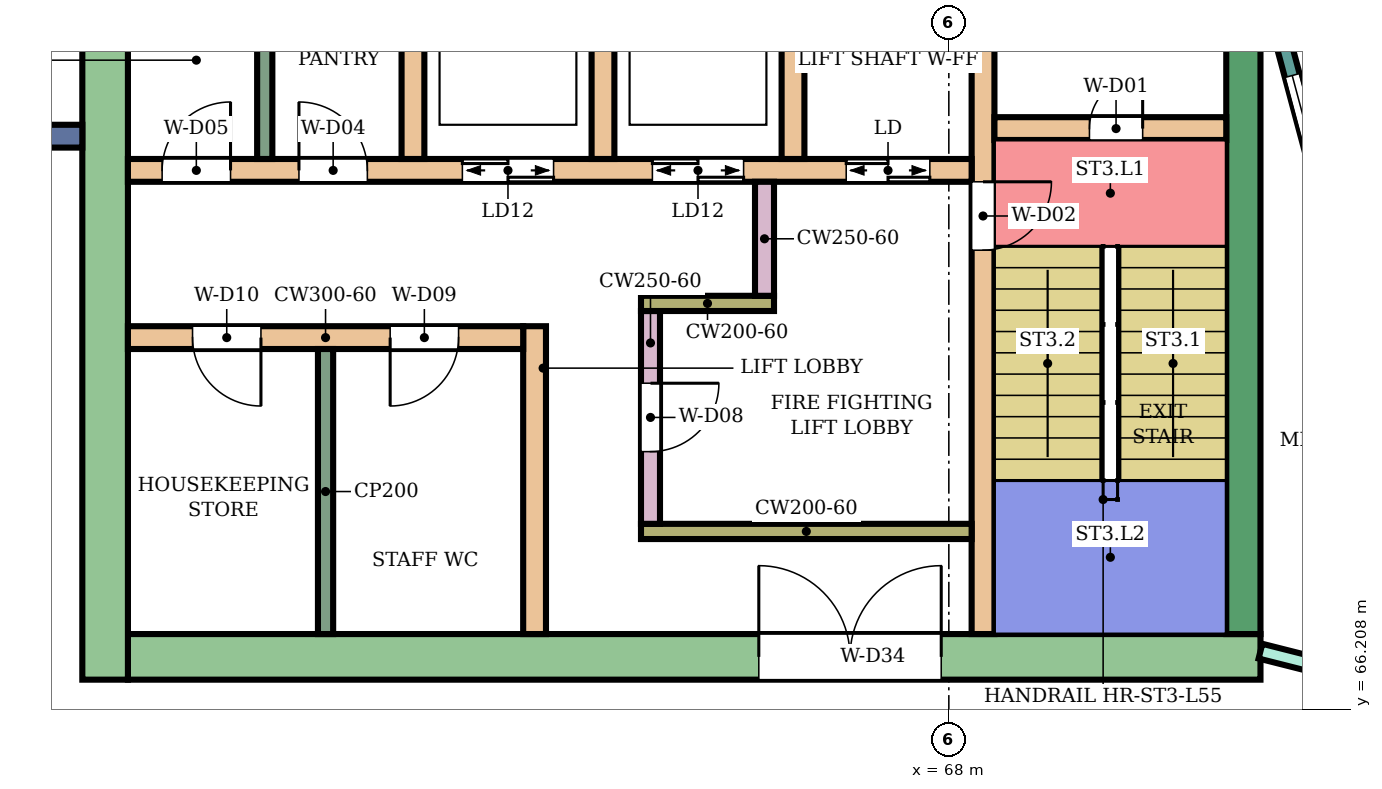
"""IFC4 building model, lengths in metres.
Left out: names, types, materials, properties, quantities, classifications, styles, units other than length and angle.
Written with IfcOpenShell. Run it as: python <this file> out.ifc"""

import sys

from ifc_helpers import new_model, si_unit, direction, frame, frame_2d, origin, place, context, subcontext, project, spatial, rectangle, extrude, element, fill, save


model = new_model("IFC4")
c1 = context("Model", 3, precision=1e-05, world=origin(), true_north=direction((0.0, 1.0)))
c2 = subcontext(c1, "Body", "Model", "MODEL_VIEW")
j1 = project(units=[si_unit("LENGTHUNIT", "METRE"), si_unit("PLANEANGLEUNIT", "RADIAN")], contexts=[c1])
p1 = place(None, origin())
s1 = spatial("IfcSite", under=j1, at=p1, CompositionType="ELEMENT")
p2 = place(p1, origin())
s2 = spatial("IfcBuilding", under=s1, at=p2, CompositionType="ELEMENT")
p3 = place(p2, frame((0.0, 0.0, 241.5)))
s3 = spatial("IfcBuildingStorey", under=s2, at=p3, CompositionType="ELEMENT", Elevation=241.5)
p4 = place(p3, frame((72.1, 66.9, 0.0), z_axis=(0.0, 0.0, 1.0), x_axis=(-1.0, 0.0, 0.0)))
e1 = element("IfcWall", 1, at=p4, inside=s3, PredefinedType="SHEAR", context=c2, shape_type="SweptSolid", body=[
    extrude(rectangle(XDim=14.9, YDim=0.6, at=frame_2d((7.45, 0.0))), origin(), (0.0, 0.0, 1.0), 3.88),
])
p5 = place(p4, frame((4.2, 0.0, 0.0)))
e2 = element("IfcOpeningElement", 2, at=p5, cuts=e1, PredefinedType="OPENING", context=c2, shape_type="SweptSolid", body=[
    extrude(rectangle(XDim=2.4, YDim=2.4, at=frame_2d((1.2, 1.2))), frame((0.0, 0.31, 0.0), z_axis=(0.0, -1.0, 0.0), x_axis=(1.0, 0.0, 0.0)), (0.0, 0.0, 1.0), 0.62),
])
p6 = place(p3, frame((71.875, 75.0, 0.0), z_axis=(0.0, 0.0, 1.0), x_axis=(0.0, -1.0, 0.0)))
e3 = element("IfcWall", 3, at=p6, inside=s3, PredefinedType="SHEAR", context=c2, shape_type="SweptSolid", body=[
    extrude(rectangle(XDim=7.8, YDim=0.45, at=frame_2d((3.9, 0.0))), origin(), (0.0, 0.0, 1.0), 3.88),
])
p7 = place(p3, frame((56.9, 83.4, 0.0), z_axis=(0.0, 0.0, 1.0), x_axis=(0.0, -1.0, 0.0)))
e4 = element("IfcWall", 4, at=p7, inside=s3, PredefinedType="SHEAR", context=c2, shape_type="SweptSolid", body=[
    extrude(rectangle(XDim=16.8, YDim=0.6, at=frame_2d((8.4, 0.0))), origin(), (0.0, 0.0, 1.0), 3.88),
])
p8 = place(p3, frame((68.45, 75.0, 0.0), z_axis=(0.0, 0.0, 1.0), x_axis=(0.0, -1.0, 0.0)))
e5 = element("IfcWall", 5, at=p8, inside=s3, PredefinedType="SHEAR", context=c2, shape_type="SweptSolid", body=[
    extrude(rectangle(XDim=7.8, YDim=0.3, at=frame_2d((3.9, 0.0))), origin(), (0.0, 0.0, 1.0), 3.88),
])
p9 = place(p8, frame((1.85, 0.0, 0.0)))
e6 = element("IfcOpeningElement", 6, at=p9, cuts=e5, PredefinedType="OPENING", context=c2, shape_type="SweptSolid", body=[
    extrude(rectangle(XDim=0.9, YDim=2.1, at=frame_2d((0.45, 1.05))), frame((0.0, 0.16, 0.0), z_axis=(0.0, -1.0, 0.0), x_axis=(1.0, 0.0, 0.0)), (0.0, 0.0, 1.0), 0.32),
])
p10 = place(p3, frame((71.65, 73.85, 0.0), z_axis=(0.0, 0.0, 1.0), x_axis=(-1.0, 0.0, 0.0)))
e7 = element("IfcWall", 7, at=p10, inside=s3, PredefinedType="SHEAR", context=c2, shape_type="SweptSolid", body=[
    extrude(rectangle(XDim=3.05, YDim=0.3, at=frame_2d((1.525, 0.0))), origin(), (0.0, 0.0, 1.0), 3.88),
])
p11 = place(p10, frame((1.1, 0.0, 0.0)))
e8 = element("IfcOpeningElement", 8, at=p11, cuts=e7, PredefinedType="OPENING", context=c2, shape_type="SweptSolid", body=[
    extrude(rectangle(XDim=0.7, YDim=2.0, at=frame_2d((0.35, 1.0))), frame((0.0, 0.16, 0.0), z_axis=(0.0, -1.0, 0.0), x_axis=(1.0, 0.0, 0.0)), (0.0, 0.0, 1.0), 0.32),
])
p12 = place(p3, frame((68.3, 73.3, 0.0), z_axis=(0.0, 0.0, 1.0), x_axis=(-1.0, 0.0, 0.0)))
e9 = element("IfcWall", 9, at=p12, inside=s3, PredefinedType="SHEAR", context=c2, shape_type="SweptSolid", body=[
    extrude(rectangle(XDim=11.1, YDim=0.3, at=frame_2d((5.55, 0.0))), origin(), (0.0, 0.0, 1.0), 3.88),
])
p13 = place(p12, frame((0.55, 0.0, 0.0)))
e10 = element("IfcOpeningElement", 10, at=p13, cuts=e9, PredefinedType="OPENING", context=c2, shape_type="SweptSolid", body=[
    extrude(rectangle(XDim=1.1, YDim=2.1, at=frame_2d((0.55, 1.05))), frame((0.0, 0.16, 0.0), z_axis=(0.0, -1.0, 0.0), x_axis=(1.0, 0.0, 0.0)), (0.0, 0.0, 1.0), 0.32),
])
p14 = place(p12, frame((3.0, 0.0, 0.0)))
e11 = element("IfcOpeningElement", 11, at=p14, cuts=e9, PredefinedType="OPENING", context=c2, shape_type="SweptSolid", body=[
    extrude(rectangle(XDim=1.2, YDim=2.1, at=frame_2d((0.6, 1.05))), frame((0.0, 0.16, 0.0), z_axis=(0.0, -1.0, 0.0), x_axis=(1.0, 0.0, 0.0)), (0.0, 0.0, 1.0), 0.32),
])
p15 = place(p12, frame((5.5, 0.0, 0.0)))
e12 = element("IfcOpeningElement", 12, at=p15, cuts=e9, PredefinedType="OPENING", context=c2, shape_type="SweptSolid", body=[
    extrude(rectangle(XDim=1.2, YDim=2.1, at=frame_2d((0.6, 1.05))), frame((0.0, 0.16, 0.0), z_axis=(0.0, -1.0, 0.0), x_axis=(1.0, 0.0, 0.0)), (0.0, 0.0, 1.0), 0.32),
])
p16 = place(p12, frame((7.95, 0.0, 0.0)))
e13 = element("IfcOpeningElement", 13, at=p16, cuts=e9, PredefinedType="OPENING", context=c2, shape_type="SweptSolid", body=[
    extrude(rectangle(XDim=0.9, YDim=2.1, at=frame_2d((0.45, 1.05))), frame((0.0, 0.16, 0.0), z_axis=(0.0, -1.0, 0.0), x_axis=(1.0, 0.0, 0.0)), (0.0, 0.0, 1.0), 0.32),
])
p17 = place(p12, frame((9.75, 0.0, 0.0)))
e14 = element("IfcOpeningElement", 14, at=p17, cuts=e9, PredefinedType="OPENING", context=c2, shape_type="SweptSolid", body=[
    extrude(rectangle(XDim=0.9, YDim=2.1, at=frame_2d((0.45, 1.05))), frame((0.0, 0.16, 0.0), z_axis=(0.0, -1.0, 0.0), x_axis=(1.0, 0.0, 0.0)), (0.0, 0.0, 1.0), 0.32),
])
for number, where, z_axis, x_axis in (
    (15, (65.95, 76.0, 0.0), (0.0, 0.0, 1.0), (0.0, -1.0, 0.0)),
    (16, (63.45, 76.0, 0.0), (0.0, 0.0, 1.0), (0.0, -1.0, 0.0)),
    (17, (60.95, 76.0, 0.0), (0.0, 0.0, 1.0), (0.0, -1.0, 0.0)),
):
    element("IfcWall", number, at=place(p3, frame(where, z_axis=z_axis, x_axis=x_axis)), inside=s3, PredefinedType="SHEAR", context=c2, shape_type="SweptSolid", body=[
        extrude(rectangle(XDim=2.55, YDim=0.3, at=frame_2d((1.275, 0.0))), origin(), (0.0, 0.0, 1.0), 3.88),
    ])
p18 = place(p3, frame((68.3, 68.55, 0.0), z_axis=(0.0, 0.0, 1.0), x_axis=(-1.0, 0.0, 0.0)))
e18 = element("IfcWall", 18, at=p18, inside=s3, PredefinedType="SHEAR", context=c2, shape_type="SweptSolid", body=[
    extrude(rectangle(XDim=4.35, YDim=0.2, at=frame_2d((2.175, 0.0))), origin(), (0.0, 0.0, 1.0), 3.88),
])
p19 = place(p3, frame((64.075, 71.45, 0.0), z_axis=(0.0, 0.0, 1.0), x_axis=(0.0, -1.0, 0.0)))
e19 = element("IfcWall", 19, at=p19, inside=s3, PredefinedType="SHEAR", context=c2, shape_type="SweptSolid", body=[
    extrude(rectangle(XDim=2.8, YDim=0.25, at=frame_2d((1.4, 0.0))), origin(), (0.0, 0.0, 1.0), 3.88),
])
p20 = place(p19, frame((0.95, 0.0, 0.0)))
e20 = element("IfcOpeningElement", 20, at=p20, cuts=e19, PredefinedType="OPENING", context=c2, shape_type="SweptSolid", body=[
    extrude(rectangle(XDim=0.9, YDim=2.1, at=frame_2d((0.45, 1.05))), frame((0.0, 0.135, 0.0), z_axis=(0.0, -1.0, 0.0), x_axis=(1.0, 0.0, 0.0)), (0.0, 0.0, 1.0), 0.27),
])
p21 = place(p3, frame((65.7, 71.55, 0.0), z_axis=(0.0, 0.0, 1.0), x_axis=(-1.0, 0.0, 0.0)))
e21 = element("IfcWall", 21, at=p21, inside=s3, PredefinedType="SHEAR", context=c2, shape_type="SweptSolid", body=[
    extrude(rectangle(XDim=1.75, YDim=0.2, at=frame_2d((0.875, 0.0))), origin(), (0.0, 0.0, 1.0), 3.88),
])
p22 = place(p3, frame((65.575, 73.15, 0.0), z_axis=(0.0, 0.0, 1.0), x_axis=(0.0, -1.0, 0.0)))
e22 = element("IfcWall", 22, at=p22, inside=s3, PredefinedType="SHEAR", context=c2, shape_type="SweptSolid", body=[
    extrude(rectangle(XDim=1.5, YDim=0.25, at=frame_2d((0.75, 0.0))), origin(), (0.0, 0.0, 1.0), 3.88),
])
p23 = place(p3, frame((62.55, 71.25, 0.0), z_axis=(0.0, 0.0, 1.0), x_axis=(0.0, -1.0, 0.0)))
e23 = element("IfcWall", 23, at=p23, inside=s3, PredefinedType="SHEAR", context=c2, shape_type="SweptSolid", body=[
    extrude(rectangle(XDim=4.05, YDim=0.3, at=frame_2d((2.025, 0.0))), origin(), (0.0, 0.0, 1.0), 3.88),
])
p24 = place(p3, frame((62.4, 71.1, 0.0), z_axis=(0.0, 0.0, 1.0), x_axis=(-1.0, 0.0, 0.0)))
e24 = element("IfcWall", 24, at=p24, inside=s3, PredefinedType="SHEAR", context=c2, shape_type="SweptSolid", body=[
    extrude(rectangle(XDim=5.2, YDim=0.3, at=frame_2d((2.6, 0.0))), origin(), (0.0, 0.0, 1.0), 3.88),
])
p25 = place(p24, frame((0.85, 0.0, 0.0)))
e25 = element("IfcOpeningElement", 25, at=p25, cuts=e24, PredefinedType="OPENING", context=c2, shape_type="SweptSolid", body=[
    extrude(rectangle(XDim=0.9, YDim=2.1, at=frame_2d((0.45, 1.05))), frame((0.0, 0.16, 0.0), z_axis=(0.0, -1.0, 0.0), x_axis=(1.0, 0.0, 0.0)), (0.0, 0.0, 1.0), 0.32),
])
p26 = place(p24, frame((3.45, 0.0, 0.0)))
e26 = element("IfcOpeningElement", 26, at=p26, cuts=e24, PredefinedType="OPENING", context=c2, shape_type="SweptSolid", body=[
    extrude(rectangle(XDim=0.9, YDim=2.1, at=frame_2d((0.45, 1.05))), frame((0.0, 0.16, 0.0), z_axis=(0.0, -1.0, 0.0), x_axis=(1.0, 0.0, 0.0)), (0.0, 0.0, 1.0), 0.32),
])
p27 = place(p3, frame((56.6, 73.75, 0.0), z_axis=(0.0, 0.0, 1.0), x_axis=(-1.0, 0.0, 0.0)))
e27 = element("IfcWall", 27, at=p27, inside=s3, PredefinedType="NOTDEFINED", context=c2, shape_type="SweptSolid", body=[
    extrude(rectangle(XDim=2.416, YDim=0.3, at=frame_2d((1.208, 0.0))), origin(), (0.0, 0.0, 1.0), 4.2),
])
p28 = place(p3, frame((72.396, 75.0, 0.0), z_axis=(0.0, 0.0, 1.0), x_axis=(0.258789828301, -0.965933654434, 0.0)))
e28 = element("IfcWall", 28, at=p28, inside=s3, PredefinedType="NOTDEFINED", context=c2, shape_type="SweptSolid", body=[
    extrude(rectangle(XDim=3.936, YDim=0.2, at=frame_2d((1.968, 0.0))), origin(), (0.0, 0.0, 1.0), 4.2),
])
p29 = place(p28, frame((0.468, 0.0, 0.9)))
e29 = element("IfcOpeningElement", 29, at=p29, cuts=e28, PredefinedType="OPENING", context=c2, shape_type="SweptSolid", body=[
    extrude(rectangle(XDim=3.0, YDim=2.3, at=frame_2d((1.5, 1.15))), frame((0.0, 0.11, 0.0), z_axis=(0.0, -1.0, 0.0), x_axis=(1.0, 0.0, 0.0)), (0.0, 0.0, 1.0), 0.22),
])
p30 = place(p3, frame((72.1, 66.975, 0.0), z_axis=(0.0, 0.0, 1.0), x_axis=(0.969471314457, -0.245204752086, 0.0)))
e30 = element("IfcWall", 30, at=p30, inside=s3, PredefinedType="PARTITIONING", context=c2, shape_type="SweptSolid", body=[
    extrude(rectangle(XDim=2.582, YDim=0.2, at=frame_2d((1.291, 0.0))), origin(), (0.0, 0.0, 1.0), 3.75),
])
p31 = place(p30, frame((0.841, 0.0, 0.0)))
e31 = element("IfcOpeningElement", 31, at=p31, cuts=e30, PredefinedType="OPENING", context=c2, shape_type="SweptSolid", body=[
    extrude(rectangle(XDim=0.9, YDim=2.1, at=frame_2d((0.45, 1.05))), frame((0.0, 0.11, 0.0), z_axis=(0.0, -1.0, 0.0), x_axis=(1.0, 0.0, 0.0)), (0.0, 0.0, 1.0), 0.22),
])
p32 = place(p3, frame((59.0, 76.0, 0.0), z_axis=(0.0, 0.0, 1.0), x_axis=(0.0, -1.0, 0.0)))
e32 = element("IfcWall", 32, at=p32, inside=s3, PredefinedType="PARTITIONING", context=c2, shape_type="SweptSolid", body=[
    extrude(rectangle(XDim=2.55, YDim=0.2, at=frame_2d((1.275, 0.0))), origin(), (0.0, 0.0, 1.0), 3.88),
])
p33 = place(p3, frame((59.8, 70.95, 0.0), z_axis=(0.0, 0.0, 1.0), x_axis=(0.0, -1.0, 0.0)))
e33 = element("IfcWall", 33, at=p33, inside=s3, PredefinedType="PARTITIONING", context=c2, shape_type="SweptSolid", body=[
    extrude(rectangle(XDim=3.75, YDim=0.2, at=frame_2d((1.875, 0.0))), origin(), (0.0, 0.0, 1.0), 3.88),
])
p34 = place(p29, origin())
e34 = element("IfcWindow", 34, at=p34, inside=s3, PartitioningType="SINGLE_PANEL", PredefinedType="WINDOW", context=c2, shape_type="SweptSolid", body=[
    extrude(rectangle(XDim=3.0, YDim=2.3, at=frame_2d((1.5, 1.15))), frame((0.0, 0.03, 0.0), z_axis=(0.0, -1.0, 0.0), x_axis=(1.0, 0.0, 0.0)), (0.0, 0.0, 1.0), 0.06),
])
fill(e29, e34)
p35 = place(p11, frame((0.7, 0.0, 0.0), z_axis=(0.0, 0.0, 1.0), x_axis=(-1.0, 0.0, 0.0)))
e35 = element("IfcDoor", 35, at=p35, inside=s3, OperationType="SINGLE_SWING_RIGHT", PredefinedType="DOOR", context=c2, shape_type="SweptSolid", body=[
    extrude(rectangle(XDim=0.7, YDim=2.0, at=frame_2d((0.35, 1.0))), frame((0.0, 0.025, 0.0), z_axis=(0.0, -1.0, 0.0), x_axis=(1.0, 0.0, 0.0)), (0.0, 0.0, 1.0), 0.05),
])
fill(e8, e35)
p36 = place(p9, origin())
e36 = element("IfcDoor", 36, at=p36, inside=s3, OperationType="SINGLE_SWING_LEFT", PredefinedType="DOOR", context=c2, shape_type="SweptSolid", body=[
    extrude(rectangle(XDim=0.9, YDim=2.1, at=frame_2d((0.45, 1.05))), frame((0.0, 0.025, 0.0), z_axis=(0.0, -1.0, 0.0), x_axis=(1.0, 0.0, 0.0)), (0.0, 0.0, 1.0), 0.05),
])
fill(e6, e36)
p37 = place(p13, origin())
e37 = element("IfcDoor", 37, at=p37, inside=s3, OperationType="DOUBLE_DOOR_SLIDING", PredefinedType="DOOR", context=c2, shape_type="SweptSolid", body=[
    extrude(rectangle(XDim=1.1, YDim=2.1, at=frame_2d((0.55, 1.05))), frame((0.0, 0.025, 0.0), z_axis=(0.0, -1.0, 0.0), x_axis=(1.0, 0.0, 0.0)), (0.0, 0.0, 1.0), 0.05),
])
fill(e10, e37)
p38 = place(p14, origin())
e38 = element("IfcDoor", 38, at=p38, inside=s3, OperationType="DOUBLE_DOOR_SLIDING", PredefinedType="DOOR", context=c2, shape_type="SweptSolid", body=[
    extrude(rectangle(XDim=1.2, YDim=2.1, at=frame_2d((0.6, 1.05))), frame((0.0, 0.025, 0.0), z_axis=(0.0, -1.0, 0.0), x_axis=(1.0, 0.0, 0.0)), (0.0, 0.0, 1.0), 0.05),
])
fill(e11, e38)
p39 = place(p15, origin())
e39 = element("IfcDoor", 39, at=p39, inside=s3, OperationType="DOUBLE_DOOR_SLIDING", PredefinedType="DOOR", context=c2, shape_type="SweptSolid", body=[
    extrude(rectangle(XDim=1.2, YDim=2.1, at=frame_2d((0.6, 1.05))), frame((0.0, 0.025, 0.0), z_axis=(0.0, -1.0, 0.0), x_axis=(1.0, 0.0, 0.0)), (0.0, 0.0, 1.0), 0.05),
])
fill(e12, e39)
p40 = place(p16, frame((0.9, 0.0, 0.0), z_axis=(0.0, 0.0, 1.0), x_axis=(-1.0, 0.0, 0.0)))
e40 = element("IfcDoor", 40, at=p40, inside=s3, OperationType="SINGLE_SWING_LEFT", PredefinedType="DOOR", context=c2, shape_type="SweptSolid", body=[
    extrude(rectangle(XDim=0.9, YDim=2.1, at=frame_2d((0.45, 1.05))), frame((0.0, 0.025, 0.0), z_axis=(0.0, -1.0, 0.0), x_axis=(1.0, 0.0, 0.0)), (0.0, 0.0, 1.0), 0.05),
])
fill(e13, e40)
p41 = place(p17, frame((0.9, 0.0, 0.0), z_axis=(0.0, 0.0, 1.0), x_axis=(-1.0, 0.0, 0.0)))
e41 = element("IfcDoor", 41, at=p41, inside=s3, OperationType="SINGLE_SWING_RIGHT", PredefinedType="DOOR", context=c2, shape_type="SweptSolid", body=[
    extrude(rectangle(XDim=0.9, YDim=2.1, at=frame_2d((0.45, 1.05))), frame((0.0, 0.025, 0.0), z_axis=(0.0, -1.0, 0.0), x_axis=(1.0, 0.0, 0.0)), (0.0, 0.0, 1.0), 0.05),
])
fill(e14, e41)
p42 = place(p20, origin())
e42 = element("IfcDoor", 42, at=p42, inside=s3, OperationType="SINGLE_SWING_LEFT", PredefinedType="DOOR", context=c2, shape_type="SweptSolid", body=[
    extrude(rectangle(XDim=0.9, YDim=2.1, at=frame_2d((0.45, 1.05))), frame((0.0, 0.025, 0.0), z_axis=(0.0, -1.0, 0.0), x_axis=(1.0, 0.0, 0.0)), (0.0, 0.0, 1.0), 0.05),
])
fill(e20, e42)
p43 = place(p25, origin())
e43 = element("IfcDoor", 43, at=p43, inside=s3, OperationType="SINGLE_SWING_RIGHT", PredefinedType="DOOR", context=c2, shape_type="SweptSolid", body=[
    extrude(rectangle(XDim=0.9, YDim=2.1, at=frame_2d((0.45, 1.05))), frame((0.0, 0.025, 0.0), z_axis=(0.0, -1.0, 0.0), x_axis=(1.0, 0.0, 0.0)), (0.0, 0.0, 1.0), 0.05),
])
fill(e25, e43)
p44 = place(p26, origin())
e44 = element("IfcDoor", 44, at=p44, inside=s3, OperationType="SINGLE_SWING_LEFT", PredefinedType="DOOR", context=c2, shape_type="SweptSolid", body=[
    extrude(rectangle(XDim=0.9, YDim=2.1, at=frame_2d((0.45, 1.05))), frame((0.0, 0.025, 0.0), z_axis=(0.0, -1.0, 0.0), x_axis=(1.0, 0.0, 0.0)), (0.0, 0.0, 1.0), 0.05),
])
fill(e26, e44)
p45 = place(p5, frame((2.4, 0.0, 0.0), z_axis=(0.0, 0.0, 1.0), x_axis=(-1.0, 0.0, 0.0)))
e45 = element("IfcDoor", 45, at=p45, inside=s3, OperationType="DOUBLE_DOOR_SINGLE_SWING", PredefinedType="DOOR", context=c2, shape_type="SweptSolid", body=[
    extrude(rectangle(XDim=2.4, YDim=2.4, at=frame_2d((1.2, 1.2))), frame((0.0, 0.025, 0.0), z_axis=(0.0, -1.0, 0.0), x_axis=(1.0, 0.0, 0.0)), (0.0, 0.0, 1.0), 0.05),
])
fill(e2, e45)
save(model, sys.argv[1])
